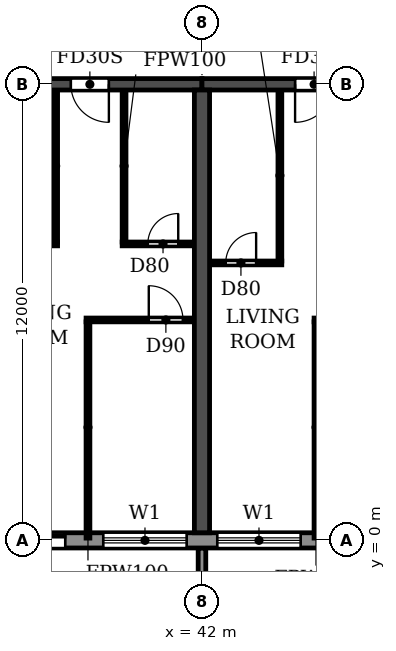
"""IFC4 building model, lengths in metres.
Left out: names, types, materials, properties, quantities, classifications, styles, units other than length and angle.
Written with IfcOpenShell. Run it as: python <this file> out.ifc"""

import sys

from ifc_helpers import new_model, si_unit, direction, frame, frame_2d, origin, place, context, subcontext, project, spatial, polyline, rectangle, outline, extrude, source, transform, mapped, element, fill, save


model = new_model("IFC4")
c1 = context("Model", 3, precision=1e-05, world=origin(), true_north=direction((0.0, 1.0)))
c2 = subcontext(c1, "Body", "Model", "MODEL_VIEW")
j1 = project(units=[si_unit("LENGTHUNIT", "METRE"), si_unit("PLANEANGLEUNIT", "RADIAN")], contexts=[c1])
p1 = place(None, origin())
s1 = spatial("IfcSite", under=j1, at=p1, CompositionType="ELEMENT")
p2 = place(p1, origin())
s2 = spatial("IfcBuilding", under=s1, at=p2, CompositionType="ELEMENT")
p3 = place(p2, frame((0.0, 0.0, 26.7)))
s3 = spatial("IfcBuildingStorey", under=s2, at=p3, CompositionType="ELEMENT", Elevation=26.7)
p4 = place(p3, frame((42.0, 0.2, 0.0), z_axis=(0.0, 0.0, 1.0), x_axis=(0.0, 1.0, 0.0)))
e1 = element("IfcWall", 1, at=p4, inside=s3, PredefinedType="SHEAR", context=c2, shape_type="SweptSolid", body=[
    extrude(rectangle(XDim=11.65, YDim=0.4, at=frame_2d((5.825, 0.0))), origin(), (0.0, 0.0, 1.0), 3.05),
])
p5 = place(p3, frame((36.0, 12.0, 0.0), z_axis=(0.0, 0.0, 1.0), x_axis=(1.0, 0.0, 0.0)))
e2 = element("IfcWall", 2, at=p5, inside=s3, PredefinedType="SHEAR", context=c2, shape_type="SweptSolid", body=[
    extrude(rectangle(XDim=6.0, YDim=0.3, at=frame_2d((3.0, 0.0))), origin(), (0.0, 0.0, 1.0), 2.45),
])
p6 = place(p5, frame((2.55, 0.0, 0.0)))
e3 = element("IfcOpeningElement", 3, at=p6, cuts=e2, PredefinedType="OPENING", context=c2, shape_type="SweptSolid", body=[
    extrude(rectangle(XDim=1.0, YDim=2.1, at=frame_2d((0.5, 1.05))), frame((0.0, 0.16, 0.0), z_axis=(0.0, -1.0, 0.0), x_axis=(1.0, 0.0, 0.0)), (0.0, 0.0, 1.0), 0.32),
])
p7 = place(p3, frame((42.0, 12.0, 0.0), z_axis=(0.0, 0.0, 1.0), x_axis=(1.0, 0.0, 0.0)))
e4 = element("IfcWall", 4, at=p7, inside=s3, PredefinedType="SHEAR", context=c2, shape_type="SweptSolid", body=[
    extrude(rectangle(XDim=6.0, YDim=0.3, at=frame_2d((3.0, 0.0))), origin(), (0.0, 0.0, 1.0), 2.45),
])
p8 = place(p7, frame((2.45, 0.0, 0.0)))
e5 = element("IfcOpeningElement", 5, at=p8, cuts=e4, PredefinedType="OPENING", context=c2, shape_type="SweptSolid", body=[
    extrude(rectangle(XDim=1.0, YDim=2.1, at=frame_2d((0.5, 1.05))), frame((0.0, 0.16, 0.0), z_axis=(0.0, -1.0, 0.0), x_axis=(1.0, 0.0, 0.0)), (0.0, 0.0, 1.0), 0.32),
])
p9 = place(p3, frame((4.683, 0.0, 0.0), z_axis=(0.0, 0.0, 1.0), x_axis=(1.0, 0.0, 0.0)))
e6 = element("IfcWall", 6, at=p9, inside=s3, PredefinedType="STANDARD", context=c2, shape_type="SweptSolid", body=[
    extrude(rectangle(XDim=92.634, YDim=0.4, at=frame_2d((46.317, 0.0))), origin(), (0.0, 0.0, 1.0), 3.05),
])
p10 = place(p9, frame((1.717, 0.0, 0.9)))
e7 = element("IfcOpeningElement", 7, at=p10, cuts=e6, PredefinedType="OPENING", context=c2, shape_type="SweptSolid", body=[
    extrude(rectangle(XDim=2.2, YDim=1.5, at=frame_2d((1.1, 0.75))), frame((0.0, 0.21, 0.0), z_axis=(0.0, -1.0, 0.0), x_axis=(1.0, 0.0, 0.0)), (0.0, 0.0, 1.0), 0.42),
])
p11 = place(p9, frame((4.717, 0.0, 0.9)))
e8 = element("IfcOpeningElement", 8, at=p11, cuts=e6, PredefinedType="OPENING", context=c2, shape_type="SweptSolid", body=[
    extrude(rectangle(XDim=2.2, YDim=1.5, at=frame_2d((1.1, 0.75))), frame((0.0, 0.21, 0.0), z_axis=(0.0, -1.0, 0.0), x_axis=(1.0, 0.0, 0.0)), (0.0, 0.0, 1.0), 0.42),
])
p12 = place(p9, frame((7.717, 0.0, 0.9)))
e9 = element("IfcOpeningElement", 9, at=p12, cuts=e6, PredefinedType="OPENING", context=c2, shape_type="SweptSolid", body=[
    extrude(rectangle(XDim=2.2, YDim=1.5, at=frame_2d((1.1, 0.75))), frame((0.0, 0.21, 0.0), z_axis=(0.0, -1.0, 0.0), x_axis=(1.0, 0.0, 0.0)), (0.0, 0.0, 1.0), 0.42),
])
p13 = place(p9, frame((10.717, 0.0, 0.9)))
e10 = element("IfcOpeningElement", 10, at=p13, cuts=e6, PredefinedType="OPENING", context=c2, shape_type="SweptSolid", body=[
    extrude(rectangle(XDim=2.2, YDim=1.5, at=frame_2d((1.1, 0.75))), frame((0.0, 0.21, 0.0), z_axis=(0.0, -1.0, 0.0), x_axis=(1.0, 0.0, 0.0)), (0.0, 0.0, 1.0), 0.42),
])
p14 = place(p9, frame((13.717, 0.0, 0.9)))
e11 = element("IfcOpeningElement", 11, at=p14, cuts=e6, PredefinedType="OPENING", context=c2, shape_type="SweptSolid", body=[
    extrude(rectangle(XDim=2.2, YDim=1.5, at=frame_2d((1.1, 0.75))), frame((0.0, 0.21, 0.0), z_axis=(0.0, -1.0, 0.0), x_axis=(1.0, 0.0, 0.0)), (0.0, 0.0, 1.0), 0.42),
])
p15 = place(p9, frame((16.717, 0.0, 0.9)))
e12 = element("IfcOpeningElement", 12, at=p15, cuts=e6, PredefinedType="OPENING", context=c2, shape_type="SweptSolid", body=[
    extrude(rectangle(XDim=2.2, YDim=1.5, at=frame_2d((1.1, 0.75))), frame((0.0, 0.21, 0.0), z_axis=(0.0, -1.0, 0.0), x_axis=(1.0, 0.0, 0.0)), (0.0, 0.0, 1.0), 0.42),
])
p16 = place(p9, frame((19.917, 0.0, 0.0)))
e13 = element("IfcOpeningElement", 13, at=p16, cuts=e6, PredefinedType="OPENING", context=c2, shape_type="SweptSolid", body=[
    extrude(rectangle(XDim=1.8, YDim=2.4, at=frame_2d((0.9, 1.2))), frame((0.0, 0.21, 0.0), z_axis=(0.0, -1.0, 0.0), x_axis=(1.0, 0.0, 0.0)), (0.0, 0.0, 1.0), 0.42),
])
p17 = place(p9, frame((22.717, 0.0, 0.9)))
e14 = element("IfcOpeningElement", 14, at=p17, cuts=e6, PredefinedType="OPENING", context=c2, shape_type="SweptSolid", body=[
    extrude(rectangle(XDim=2.2, YDim=1.5, at=frame_2d((1.1, 0.75))), frame((0.0, 0.21, 0.0), z_axis=(0.0, -1.0, 0.0), x_axis=(1.0, 0.0, 0.0)), (0.0, 0.0, 1.0), 0.42),
])
p18 = place(p9, frame((25.717, 0.0, 0.9)))
e15 = element("IfcOpeningElement", 15, at=p18, cuts=e6, PredefinedType="OPENING", context=c2, shape_type="SweptSolid", body=[
    extrude(rectangle(XDim=2.2, YDim=1.5, at=frame_2d((1.1, 0.75))), frame((0.0, 0.21, 0.0), z_axis=(0.0, -1.0, 0.0), x_axis=(1.0, 0.0, 0.0)), (0.0, 0.0, 1.0), 0.42),
])
p19 = place(p9, frame((28.717, 0.0, 0.9)))
e16 = element("IfcOpeningElement", 16, at=p19, cuts=e6, PredefinedType="OPENING", context=c2, shape_type="SweptSolid", body=[
    extrude(rectangle(XDim=2.2, YDim=1.5, at=frame_2d((1.1, 0.75))), frame((0.0, 0.21, 0.0), z_axis=(0.0, -1.0, 0.0), x_axis=(1.0, 0.0, 0.0)), (0.0, 0.0, 1.0), 0.42),
])
p20 = place(p9, frame((31.917, 0.0, 0.0)))
e17 = element("IfcOpeningElement", 17, at=p20, cuts=e6, PredefinedType="OPENING", context=c2, shape_type="SweptSolid", body=[
    extrude(rectangle(XDim=1.8, YDim=2.4, at=frame_2d((0.9, 1.2))), frame((0.0, 0.21, 0.0), z_axis=(0.0, -1.0, 0.0), x_axis=(1.0, 0.0, 0.0)), (0.0, 0.0, 1.0), 0.42),
])
p21 = place(p9, frame((34.717, 0.0, 0.9)))
e18 = element("IfcOpeningElement", 18, at=p21, cuts=e6, PredefinedType="OPENING", context=c2, shape_type="SweptSolid", body=[
    extrude(rectangle(XDim=2.2, YDim=1.5, at=frame_2d((1.1, 0.75))), frame((0.0, 0.21, 0.0), z_axis=(0.0, -1.0, 0.0), x_axis=(1.0, 0.0, 0.0)), (0.0, 0.0, 1.0), 0.42),
])
p22 = place(p9, frame((37.717, 0.0, 0.9)))
e19 = element("IfcOpeningElement", 19, at=p22, cuts=e6, PredefinedType="OPENING", context=c2, shape_type="SweptSolid", body=[
    extrude(rectangle(XDim=2.2, YDim=1.5, at=frame_2d((1.1, 0.75))), frame((0.0, 0.21, 0.0), z_axis=(0.0, -1.0, 0.0), x_axis=(1.0, 0.0, 0.0)), (0.0, 0.0, 1.0), 0.42),
])
p23 = place(p9, frame((40.717, 0.0, 0.9)))
e20 = element("IfcOpeningElement", 20, at=p23, cuts=e6, PredefinedType="OPENING", context=c2, shape_type="SweptSolid", body=[
    extrude(rectangle(XDim=2.2, YDim=1.5, at=frame_2d((1.1, 0.75))), frame((0.0, 0.21, 0.0), z_axis=(0.0, -1.0, 0.0), x_axis=(1.0, 0.0, 0.0)), (0.0, 0.0, 1.0), 0.42),
])
p24 = place(p9, frame((43.917, 0.0, 0.0)))
e21 = element("IfcOpeningElement", 21, at=p24, cuts=e6, PredefinedType="OPENING", context=c2, shape_type="SweptSolid", body=[
    extrude(rectangle(XDim=1.8, YDim=2.4, at=frame_2d((0.9, 1.2))), frame((0.0, 0.21, 0.0), z_axis=(0.0, -1.0, 0.0), x_axis=(1.0, 0.0, 0.0)), (0.0, 0.0, 1.0), 0.42),
])
p25 = place(p9, frame((46.717, 0.0, 0.9)))
e22 = element("IfcOpeningElement", 22, at=p25, cuts=e6, PredefinedType="OPENING", context=c2, shape_type="SweptSolid", body=[
    extrude(rectangle(XDim=2.2, YDim=1.5, at=frame_2d((1.1, 0.75))), frame((0.0, 0.21, 0.0), z_axis=(0.0, -1.0, 0.0), x_axis=(1.0, 0.0, 0.0)), (0.0, 0.0, 1.0), 0.42),
])
p26 = place(p9, frame((49.717, 0.0, 0.9)))
e23 = element("IfcOpeningElement", 23, at=p26, cuts=e6, PredefinedType="OPENING", context=c2, shape_type="SweptSolid", body=[
    extrude(rectangle(XDim=2.2, YDim=1.5, at=frame_2d((1.1, 0.75))), frame((0.0, 0.21, 0.0), z_axis=(0.0, -1.0, 0.0), x_axis=(1.0, 0.0, 0.0)), (0.0, 0.0, 1.0), 0.42),
])
p27 = place(p9, frame((52.717, 0.0, 0.9)))
e24 = element("IfcOpeningElement", 24, at=p27, cuts=e6, PredefinedType="OPENING", context=c2, shape_type="SweptSolid", body=[
    extrude(rectangle(XDim=2.2, YDim=1.5, at=frame_2d((1.1, 0.75))), frame((0.0, 0.21, 0.0), z_axis=(0.0, -1.0, 0.0), x_axis=(1.0, 0.0, 0.0)), (0.0, 0.0, 1.0), 0.42),
])
p28 = place(p9, frame((55.717, 0.0, 0.9)))
e25 = element("IfcOpeningElement", 25, at=p28, cuts=e6, PredefinedType="OPENING", context=c2, shape_type="SweptSolid", body=[
    extrude(rectangle(XDim=2.2, YDim=1.5, at=frame_2d((1.1, 0.75))), frame((0.0, 0.21, 0.0), z_axis=(0.0, -1.0, 0.0), x_axis=(1.0, 0.0, 0.0)), (0.0, 0.0, 1.0), 0.42),
])
p29 = place(p9, frame((58.917, 0.0, 0.0)))
e26 = element("IfcOpeningElement", 26, at=p29, cuts=e6, PredefinedType="OPENING", context=c2, shape_type="SweptSolid", body=[
    extrude(rectangle(XDim=1.8, YDim=2.4, at=frame_2d((0.9, 1.2))), frame((0.0, 0.21, 0.0), z_axis=(0.0, -1.0, 0.0), x_axis=(1.0, 0.0, 0.0)), (0.0, 0.0, 1.0), 0.42),
])
p30 = place(p9, frame((61.717, 0.0, 0.9)))
e27 = element("IfcOpeningElement", 27, at=p30, cuts=e6, PredefinedType="OPENING", context=c2, shape_type="SweptSolid", body=[
    extrude(rectangle(XDim=2.2, YDim=1.5, at=frame_2d((1.1, 0.75))), frame((0.0, 0.21, 0.0), z_axis=(0.0, -1.0, 0.0), x_axis=(1.0, 0.0, 0.0)), (0.0, 0.0, 1.0), 0.42),
])
p31 = place(p9, frame((64.717, 0.0, 0.9)))
e28 = element("IfcOpeningElement", 28, at=p31, cuts=e6, PredefinedType="OPENING", context=c2, shape_type="SweptSolid", body=[
    extrude(rectangle(XDim=2.2, YDim=1.5, at=frame_2d((1.1, 0.75))), frame((0.0, 0.21, 0.0), z_axis=(0.0, -1.0, 0.0), x_axis=(1.0, 0.0, 0.0)), (0.0, 0.0, 1.0), 0.42),
])
p32 = place(p9, frame((67.717, 0.0, 0.9)))
e29 = element("IfcOpeningElement", 29, at=p32, cuts=e6, PredefinedType="OPENING", context=c2, shape_type="SweptSolid", body=[
    extrude(rectangle(XDim=2.2, YDim=1.5, at=frame_2d((1.1, 0.75))), frame((0.0, 0.21, 0.0), z_axis=(0.0, -1.0, 0.0), x_axis=(1.0, 0.0, 0.0)), (0.0, 0.0, 1.0), 0.42),
])
p33 = place(p9, frame((70.917, 0.0, 0.0)))
e30 = element("IfcOpeningElement", 30, at=p33, cuts=e6, PredefinedType="OPENING", context=c2, shape_type="SweptSolid", body=[
    extrude(rectangle(XDim=1.8, YDim=2.4, at=frame_2d((0.9, 1.2))), frame((0.0, 0.21, 0.0), z_axis=(0.0, -1.0, 0.0), x_axis=(1.0, 0.0, 0.0)), (0.0, 0.0, 1.0), 0.42),
])
p34 = place(p9, frame((73.717, 0.0, 0.9)))
e31 = element("IfcOpeningElement", 31, at=p34, cuts=e6, PredefinedType="OPENING", context=c2, shape_type="SweptSolid", body=[
    extrude(rectangle(XDim=2.2, YDim=1.5, at=frame_2d((1.1, 0.75))), frame((0.0, 0.21, 0.0), z_axis=(0.0, -1.0, 0.0), x_axis=(1.0, 0.0, 0.0)), (0.0, 0.0, 1.0), 0.42),
])
p35 = place(p9, frame((76.717, 0.0, 0.9)))
e32 = element("IfcOpeningElement", 32, at=p35, cuts=e6, PredefinedType="OPENING", context=c2, shape_type="SweptSolid", body=[
    extrude(rectangle(XDim=2.2, YDim=1.5, at=frame_2d((1.1, 0.75))), frame((0.0, 0.21, 0.0), z_axis=(0.0, -1.0, 0.0), x_axis=(1.0, 0.0, 0.0)), (0.0, 0.0, 1.0), 0.42),
])
p36 = place(p9, frame((79.717, 0.0, 0.9)))
e33 = element("IfcOpeningElement", 33, at=p36, cuts=e6, PredefinedType="OPENING", context=c2, shape_type="SweptSolid", body=[
    extrude(rectangle(XDim=2.2, YDim=1.5, at=frame_2d((1.1, 0.75))), frame((0.0, 0.21, 0.0), z_axis=(0.0, -1.0, 0.0), x_axis=(1.0, 0.0, 0.0)), (0.0, 0.0, 1.0), 0.42),
])
p37 = place(p9, frame((82.717, 0.0, 0.9)))
e34 = element("IfcOpeningElement", 34, at=p37, cuts=e6, PredefinedType="OPENING", context=c2, shape_type="SweptSolid", body=[
    extrude(rectangle(XDim=2.2, YDim=1.5, at=frame_2d((1.1, 0.75))), frame((0.0, 0.21, 0.0), z_axis=(0.0, -1.0, 0.0), x_axis=(1.0, 0.0, 0.0)), (0.0, 0.0, 1.0), 0.42),
])
p38 = place(p9, frame((85.717, 0.0, 0.9)))
e35 = element("IfcOpeningElement", 35, at=p38, cuts=e6, PredefinedType="OPENING", context=c2, shape_type="SweptSolid", body=[
    extrude(rectangle(XDim=2.2, YDim=1.5, at=frame_2d((1.1, 0.75))), frame((0.0, 0.21, 0.0), z_axis=(0.0, -1.0, 0.0), x_axis=(1.0, 0.0, 0.0)), (0.0, 0.0, 1.0), 0.42),
])
p39 = place(p9, frame((88.717, 0.0, 0.9)))
e36 = element("IfcOpeningElement", 36, at=p39, cuts=e6, PredefinedType="OPENING", context=c2, shape_type="SweptSolid", body=[
    extrude(rectangle(XDim=2.2, YDim=1.5, at=frame_2d((1.1, 0.75))), frame((0.0, 0.21, 0.0), z_axis=(0.0, -1.0, 0.0), x_axis=(1.0, 0.0, 0.0)), (0.0, 0.0, 1.0), 0.42),
])
m1 = source(origin(), c2, "Body", "SweptSolid", [
    extrude(outline(polyline([(0.0, 0.0), (0.2, 0.0), (0.2, 1.65), (0.0, 1.65), (0.0, 0.0)])), origin(), (0.0, 0.0, 1.0), 3.1),
])
p40 = place(p3, frame((41.9, -1.85, 0.0)))
e37 = element("IfcWall", 37, at=p40, inside=s3, PredefinedType="STANDARD", context=c2, shape_type="MappedRepresentation", body=[
    mapped(m1, transform((0.0, 0.0, 0.0))),
])
p41 = place(p3, frame((38.95, 5.8, 0.0), z_axis=(0.0, 0.0, 1.0), x_axis=(1.0, 0.0, 0.0)))
e38 = element("IfcWall", 38, at=p41, inside=s3, PredefinedType="PARTITIONING", context=c2, shape_type="SweptSolid", body=[
    extrude(rectangle(XDim=2.84, YDim=0.1, at=frame_2d((1.42, 0.0))), origin(), (0.0, 0.0, 1.0), 3.05),
])
p42 = place(p41, frame((1.65, 0.0, 0.0)))
e39 = element("IfcOpeningElement", 39, at=p42, cuts=e38, PredefinedType="OPENING", context=c2, shape_type="SweptSolid", body=[
    extrude(rectangle(XDim=0.9, YDim=2.1, at=frame_2d((0.45, 1.05))), frame((0.0, 0.06, 0.0), z_axis=(0.0, -1.0, 0.0), x_axis=(1.0, 0.0, 0.0)), (0.0, 0.0, 1.0), 0.12),
])
p43 = place(p3, frame((44.95, 5.8, 0.0), z_axis=(0.0, 0.0, 1.0), x_axis=(1.0, 0.0, 0.0)))
e40 = element("IfcWall", 40, at=p43, inside=s3, PredefinedType="PARTITIONING", context=c2, shape_type="SweptSolid", body=[
    extrude(rectangle(XDim=2.84, YDim=0.1, at=frame_2d((1.42, 0.0))), origin(), (0.0, 0.0, 1.0), 3.05),
])
p44 = place(p43, frame((0.55, 0.0, 0.0)))
e41 = element("IfcOpeningElement", 41, at=p44, cuts=e40, PredefinedType="OPENING", context=c2, shape_type="SweptSolid", body=[
    extrude(rectangle(XDim=0.9, YDim=2.1, at=frame_2d((0.45, 1.05))), frame((0.0, 0.06, 0.0), z_axis=(0.0, -1.0, 0.0), x_axis=(1.0, 0.0, 0.0)), (0.0, 0.0, 1.0), 0.12),
])
p45 = place(p3, frame((42.21, 7.3, 0.0), z_axis=(0.0, 0.0, 1.0), x_axis=(1.0, 0.0, 0.0)))
e42 = element("IfcWall", 42, at=p45, inside=s3, PredefinedType="PARTITIONING", context=c2, shape_type="SweptSolid", body=[
    extrude(rectangle(XDim=1.89, YDim=0.1, at=frame_2d((0.945, 0.0))), origin(), (0.0, 0.0, 1.0), 3.05),
])
p46 = place(p45, frame((0.415, 0.0, 0.0)))
e43 = element("IfcOpeningElement", 43, at=p46, cuts=e42, PredefinedType="OPENING", context=c2, shape_type="SweptSolid", body=[
    extrude(rectangle(XDim=0.8, YDim=2.1, at=frame_2d((0.4, 1.05))), frame((0.0, 0.06, 0.0), z_axis=(0.0, -1.0, 0.0), x_axis=(1.0, 0.0, 0.0)), (0.0, 0.0, 1.0), 0.12),
])
p47 = place(p3, frame((36.21, 7.8, 0.0), z_axis=(0.0, 0.0, 1.0), x_axis=(1.0, 0.0, 0.0)))
e44 = element("IfcWall", 44, at=p47, inside=s3, PredefinedType="PARTITIONING", context=c2, shape_type="SweptSolid", body=[
    extrude(rectangle(XDim=1.99, YDim=0.1, at=frame_2d((0.995, 0.0))), origin(), (0.0, 0.0, 1.0), 3.05),
])
p48 = place(p47, frame((0.415, 0.0, 0.0)))
e45 = element("IfcOpeningElement", 45, at=p48, cuts=e44, PredefinedType="OPENING", context=c2, shape_type="SweptSolid", body=[
    extrude(rectangle(XDim=0.9, YDim=2.1, at=frame_2d((0.45, 1.05))), frame((0.0, 0.06, 0.0), z_axis=(0.0, -1.0, 0.0), x_axis=(1.0, 0.0, 0.0)), (0.0, 0.0, 1.0), 0.12),
])
p49 = place(p3, frame((39.9, 7.8, 0.0), z_axis=(0.0, 0.0, 1.0), x_axis=(1.0, 0.0, 0.0)))
e46 = element("IfcWall", 46, at=p49, inside=s3, PredefinedType="PARTITIONING", context=c2, shape_type="SweptSolid", body=[
    extrude(rectangle(XDim=1.89, YDim=0.1, at=frame_2d((0.945, 0.0))), origin(), (0.0, 0.0, 1.0), 3.05),
])
p50 = place(p49, frame((0.675, 0.0, 0.0)))
e47 = element("IfcOpeningElement", 47, at=p50, cuts=e46, PredefinedType="OPENING", context=c2, shape_type="SweptSolid", body=[
    extrude(rectangle(XDim=0.8, YDim=2.1, at=frame_2d((0.4, 1.05))), frame((0.0, 0.06, 0.0), z_axis=(0.0, -1.0, 0.0), x_axis=(1.0, 0.0, 0.0)), (0.0, 0.0, 1.0), 0.12),
])
p51 = place(p3, frame((38.15, 7.85, 0.0), z_axis=(0.0, 0.0, 1.0), x_axis=(0.0, 1.0, 0.0)))
e48 = element("IfcWall", 48, at=p51, inside=s3, PredefinedType="PARTITIONING", context=c2, shape_type="SweptSolid", body=[
    extrude(rectangle(XDim=3.99, YDim=0.1, at=frame_2d((1.995, 0.0))), origin(), (0.0, 0.0, 1.0), 3.05),
])
p52 = place(p3, frame((39.0, 0.06, 0.0), z_axis=(0.0, 0.0, 1.0), x_axis=(0.0, 1.0, 0.0)))
e49 = element("IfcWall", 49, at=p52, inside=s3, PredefinedType="PARTITIONING", context=c2, shape_type="SweptSolid", body=[
    extrude(rectangle(XDim=5.69, YDim=0.1, at=frame_2d((2.845, 0.0))), origin(), (0.0, 0.0, 1.0), 3.05),
])
p53 = place(p3, frame((39.95, 7.85, 0.0), z_axis=(0.0, 0.0, 1.0), x_axis=(0.0, 1.0, 0.0)))
e50 = element("IfcWall", 50, at=p53, inside=s3, PredefinedType="PARTITIONING", context=c2, shape_type="SweptSolid", body=[
    extrude(rectangle(XDim=3.99, YDim=0.1, at=frame_2d((1.995, 0.0))), origin(), (0.0, 0.0, 1.0), 3.05),
])
p54 = place(p3, frame((44.05, 7.35, 0.0), z_axis=(0.0, 0.0, 1.0), x_axis=(0.0, 1.0, 0.0)))
e51 = element("IfcWall", 51, at=p54, inside=s3, PredefinedType="PARTITIONING", context=c2, shape_type="SweptSolid", body=[
    extrude(rectangle(XDim=4.49, YDim=0.1, at=frame_2d((2.245, 0.0))), origin(), (0.0, 0.0, 1.0), 3.05),
])
p55 = place(p3, frame((45.0, 0.06, 0.0), z_axis=(0.0, 0.0, 1.0), x_axis=(0.0, 1.0, 0.0)))
e52 = element("IfcWall", 52, at=p55, inside=s3, PredefinedType="PARTITIONING", context=c2, shape_type="SweptSolid", body=[
    extrude(rectangle(XDim=5.69, YDim=0.1, at=frame_2d((2.845, 0.0))), origin(), (0.0, 0.0, 1.0), 3.05),
])
p56 = place(p20, origin())
e53 = element("IfcDoor", 53, at=p56, inside=s3, OperationType="DOUBLE_DOOR_SLIDING", PredefinedType="DOOR", context=c2, shape_type="SweptSolid", body=[
    extrude(rectangle(XDim=1.8, YDim=2.4, at=frame_2d((0.9, 1.2))), frame((0.0, 0.025, 0.0), z_axis=(0.0, -1.0, 0.0), x_axis=(1.0, 0.0, 0.0)), (0.0, 0.0, 1.0), 0.05),
])
fill(e17, e53)
p57 = place(p21, origin())
e54 = element("IfcWindow", 54, at=p57, inside=s3, PartitioningType="DOUBLE_PANEL_HORIZONTAL", PredefinedType="WINDOW", context=c2, shape_type="SweptSolid", body=[
    extrude(rectangle(XDim=2.2, YDim=1.5, at=frame_2d((1.1, 0.75))), frame((0.0, 0.03, 0.0), z_axis=(0.0, -1.0, 0.0), x_axis=(1.0, 0.0, 0.0)), (0.0, 0.0, 1.0), 0.06),
])
fill(e18, e54)
p58 = place(p22, origin())
e55 = element("IfcWindow", 55, at=p58, inside=s3, PartitioningType="DOUBLE_PANEL_HORIZONTAL", PredefinedType="WINDOW", context=c2, shape_type="SweptSolid", body=[
    extrude(rectangle(XDim=2.2, YDim=1.5, at=frame_2d((1.1, 0.75))), frame((0.0, 0.03, 0.0), z_axis=(0.0, -1.0, 0.0), x_axis=(1.0, 0.0, 0.0)), (0.0, 0.0, 1.0), 0.06),
])
fill(e19, e55)
p59 = place(p6, frame((1.0, 0.0, 0.0), z_axis=(0.0, 0.0, 1.0), x_axis=(-1.0, 0.0, 0.0)))
e56 = element("IfcDoor", 56, at=p59, inside=s3, OperationType="SINGLE_SWING_LEFT", PredefinedType="DOOR", context=c2, shape_type="SweptSolid", body=[
    extrude(rectangle(XDim=1.0, YDim=2.1, at=frame_2d((0.5, 1.05))), frame((0.0, 0.025, 0.0), z_axis=(0.0, -1.0, 0.0), x_axis=(1.0, 0.0, 0.0)), (0.0, 0.0, 1.0), 0.05),
])
fill(e3, e56)
p60 = place(p50, origin())
e57 = element("IfcDoor", 57, at=p60, inside=s3, OperationType="SINGLE_SWING_RIGHT", PredefinedType="DOOR", context=c2, shape_type="SweptSolid", body=[
    extrude(rectangle(XDim=0.8, YDim=2.1, at=frame_2d((0.4, 1.05))), frame((0.0, 0.025, 0.0), z_axis=(0.0, -1.0, 0.0), x_axis=(1.0, 0.0, 0.0)), (0.0, 0.0, 1.0), 0.05),
])
fill(e47, e57)
p61 = place(p42, origin())
e58 = element("IfcDoor", 58, at=p61, inside=s3, OperationType="SINGLE_SWING_LEFT", PredefinedType="DOOR", context=c2, shape_type="SweptSolid", body=[
    extrude(rectangle(XDim=0.9, YDim=2.1, at=frame_2d((0.45, 1.05))), frame((0.0, 0.025, 0.0), z_axis=(0.0, -1.0, 0.0), x_axis=(1.0, 0.0, 0.0)), (0.0, 0.0, 1.0), 0.05),
])
fill(e39, e58)
p62 = place(p46, origin())
e59 = element("IfcDoor", 59, at=p62, inside=s3, OperationType="SINGLE_SWING_RIGHT", PredefinedType="DOOR", context=c2, shape_type="SweptSolid", body=[
    extrude(rectangle(XDim=0.8, YDim=2.1, at=frame_2d((0.4, 1.05))), frame((0.0, 0.025, 0.0), z_axis=(0.0, -1.0, 0.0), x_axis=(1.0, 0.0, 0.0)), (0.0, 0.0, 1.0), 0.05),
])
fill(e43, e59)
p63 = place(p8, frame((1.0, 0.0, 0.0), z_axis=(0.0, 0.0, 1.0), x_axis=(-1.0, 0.0, 0.0)))
e60 = element("IfcDoor", 60, at=p63, inside=s3, OperationType="SINGLE_SWING_RIGHT", PredefinedType="DOOR", context=c2, shape_type="SweptSolid", body=[
    extrude(rectangle(XDim=1.0, YDim=2.1, at=frame_2d((0.5, 1.05))), frame((0.0, 0.025, 0.0), z_axis=(0.0, -1.0, 0.0), x_axis=(1.0, 0.0, 0.0)), (0.0, 0.0, 1.0), 0.05),
])
fill(e5, e60)
save(model, sys.argv[1])
